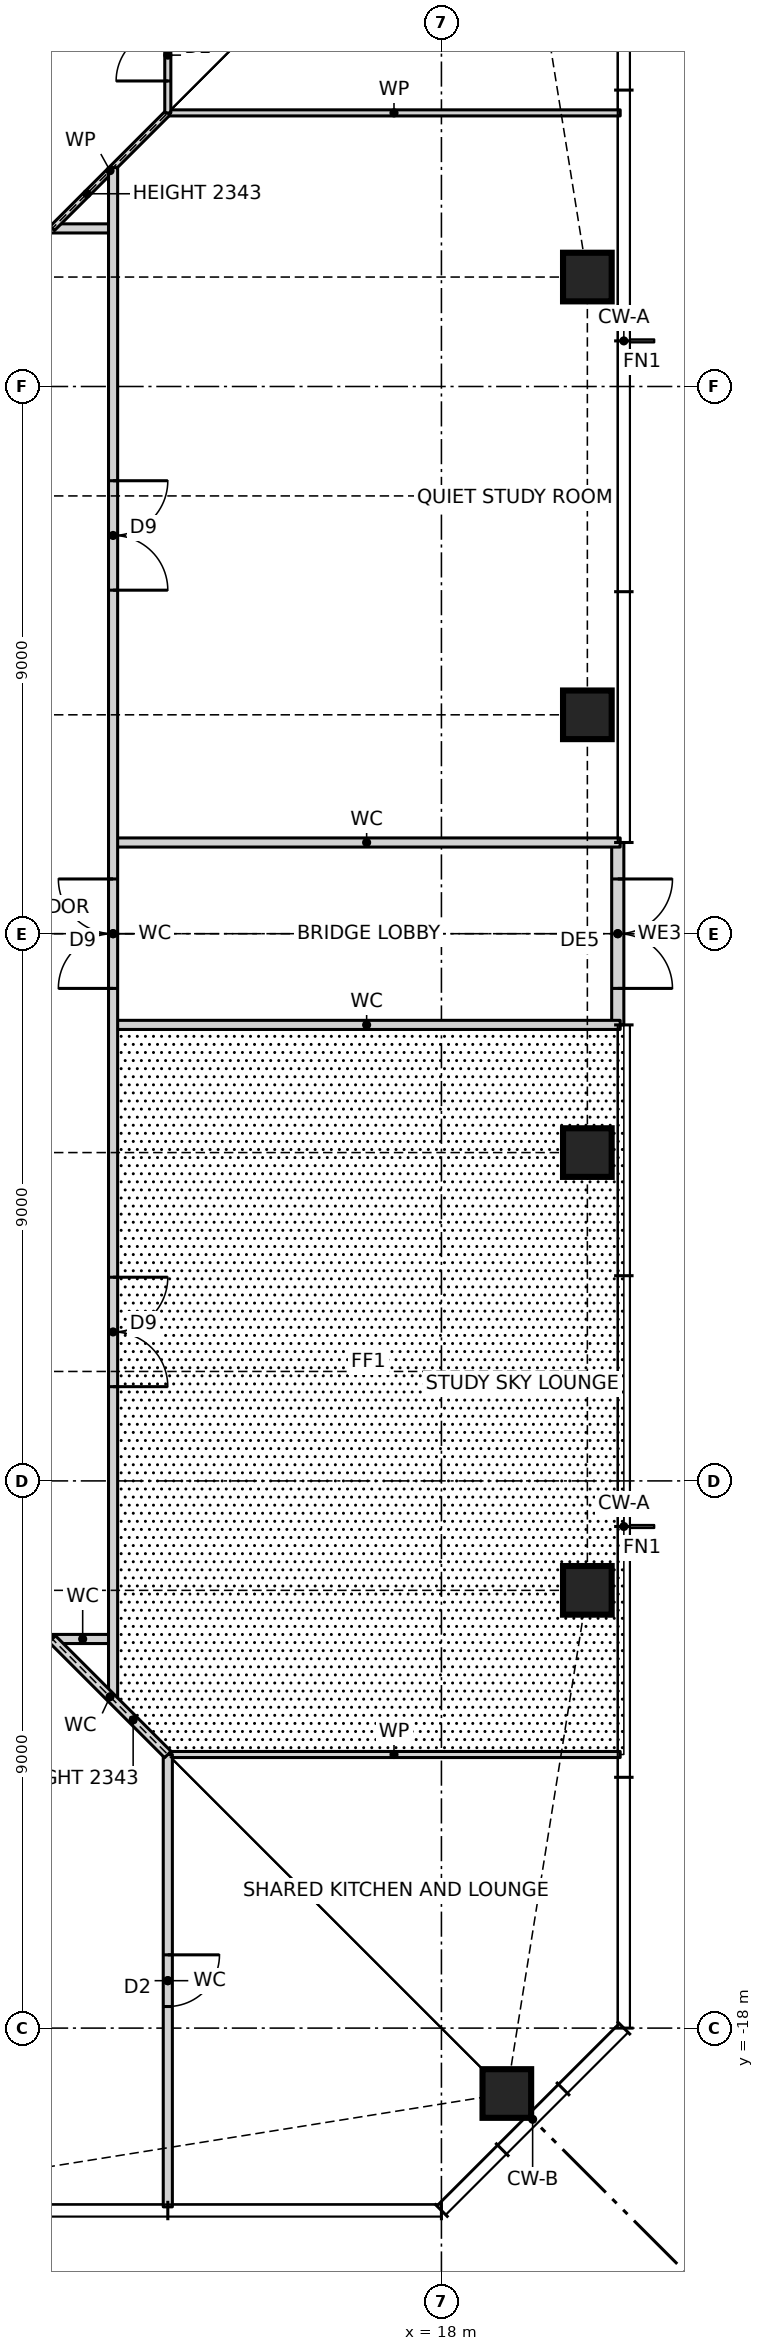
"""IFC4 building model, lengths in metres.
Left out: names, types, materials, properties, quantities, classifications, styles, units other than length and angle.
Written with IfcOpenShell. Run it as: python <this file> out.ifc"""

import sys

from ifc_helpers import new_model, si_unit, direction, frame, frame_2d, origin, origin_2d, place, context, subcontext, project, spatial, rectangle, hollow_rectangle, extrude, element, fill, save


model = new_model("IFC4")
c1 = context("Model", 3, precision=1e-05, world=origin(), true_north=direction((0.0, 1.0)))
c2 = subcontext(c1, "Body", "Model", "MODEL_VIEW")
j1 = project(units=[si_unit("LENGTHUNIT", "METRE"), si_unit("PLANEANGLEUNIT", "RADIAN")], contexts=[c1])
p1 = place(None, origin())
s1 = spatial("IfcSite", under=j1, at=p1, CompositionType="ELEMENT")
p2 = place(p1, origin())
s2 = spatial("IfcBuilding", under=s1, at=p2, CompositionType="ELEMENT")
p3 = place(p2, frame((0.0, 0.0, 98.0)))
s3 = spatial("IfcBuildingStorey", under=s2, at=p3, CompositionType="ELEMENT", Elevation=98.0)
for number, where, z_axis, x_axis in (
    (1, (19.076, -19.076, 0.0), (0.0, 0.0, 1.0), (1.0, 0.0, 0.0)),
    (2, (20.4, -10.8, 0.0), (0.0, 0.0, 1.0), (1.0, 0.0, 0.0)),
    (3, (20.4, -3.6, 0.0), (0.0, 0.0, 1.0), (1.0, 0.0, 0.0)),
    (4, (20.4, 3.6, 0.0), (0.0, 0.0, 1.0), (1.0, 0.0, 0.0)),
    (5, (20.4, 10.8, 0.0), (0.0, 0.0, 1.0), (1.0, 0.0, 0.0)),
):
    element("IfcColumn", number, at=place(p3, frame(where, z_axis=z_axis, x_axis=x_axis)), inside=s3, PredefinedType="COLUMN", context=c2, shape_type="SweptSolid", body=[
        extrude(hollow_rectangle(XDim=0.8, YDim=0.8, WallThickness=0.07, at=origin_2d()), origin(), (0.0, 0.0, 1.0), 3.5),
    ])
p4 = place(p3, frame((20.9, -1.5, 0.0), z_axis=(0.0, 0.0, 1.0), x_axis=(0.0, 1.0, 0.0)))
e6 = element("IfcWall", 6, at=p4, inside=s3, PredefinedType="SOLIDWALL", context=c2, shape_type="SweptSolid", body=[
    extrude(rectangle(XDim=3.0, YDim=0.2, at=frame_2d((1.5, 0.0))), origin(), (0.0, 0.0, 1.0), 3.27),
])
p5 = place(p4, frame((0.6, 0.0, 0.0)))
e7 = element("IfcOpeningElement", 7, at=p5, cuts=e6, PredefinedType="OPENING", context=c2, shape_type="SweptSolid", body=[
    extrude(rectangle(XDim=1.8, YDim=2.4, at=frame_2d((0.9, 1.2))), frame((0.0, 0.11, 0.0), z_axis=(0.0, -1.0, 0.0), x_axis=(1.0, 0.0, 0.0)), (0.0, 0.0, 1.0), 0.22),
])
p6 = place(p3, frame((13.5, -13.5, 0.0), z_axis=(0.0, 0.0, 1.0), x_axis=(1.0, 0.0, 0.0)))
e8 = element("IfcWall", 8, at=p6, inside=s3, PredefinedType="PARTITIONING", context=c2, shape_type="SweptSolid", body=[
    extrude(rectangle(XDim=7.44, YDim=0.1, at=frame_2d((3.72, 0.0))), origin(), (0.0, 0.0, 1.0), 3.27),
])
p7 = place(p3, frame((11.6, -11.6, 0.0), z_axis=(0.0, 0.0, 1.0), x_axis=(1.0, 0.0, 0.0)))
e9 = element("IfcWall", 9, at=p7, inside=s3, PredefinedType="PARTITIONING", context=c2, shape_type="SweptSolid", body=[
    extrude(rectangle(XDim=1.0, YDim=0.15, at=frame_2d((0.5, 0.0))), origin(), (0.0, 0.0, 1.0), 3.27),
])
for number, where, z_axis, x_axis in (
    (10, (12.6, -1.5, 0.0), (0.0, 0.0, 1.0), (1.0, 0.0, 0.0)),
    (11, (12.6, 1.5, 0.0), (0.0, 0.0, 1.0), (1.0, 0.0, 0.0)),
):
    element("IfcWall", number, at=place(p3, frame(where, z_axis=z_axis, x_axis=x_axis)), inside=s3, PredefinedType="PARTITIONING", context=c2, shape_type="SweptSolid", body=[
        extrude(rectangle(XDim=8.34, YDim=0.15, at=frame_2d((4.17, 0.0))), origin(), (0.0, 0.0, 1.0), 3.27),
    ])
p8 = place(p3, frame((-9.0, 11.6, 0.0), z_axis=(0.0, 0.0, 1.0), x_axis=(1.0, 0.0, 0.0)))
e12 = element("IfcWall", 12, at=p8, inside=s3, PredefinedType="PARTITIONING", context=c2, shape_type="SweptSolid", body=[
    extrude(rectangle(XDim=21.6, YDim=0.15, at=frame_2d((10.8, 0.0))), origin(), (0.0, 0.0, 1.0), 3.27),
])
p9 = place(p8, frame((16.3, 0.0, 0.0)))
e13 = element("IfcOpeningElement", 13, at=p9, cuts=e12, PredefinedType="OPENING", context=c2, shape_type="SweptSolid", body=[
    extrude(rectangle(XDim=1.0, YDim=2.1, at=frame_2d((0.5, 1.05))), frame((0.0, 0.085, 0.0), z_axis=(0.0, -1.0, 0.0), x_axis=(1.0, 0.0, 0.0)), (0.0, 0.0, 1.0), 0.17),
])
p10 = place(p3, frame((13.5, 13.5, 0.0), z_axis=(0.0, 0.0, 1.0), x_axis=(1.0, 0.0, 0.0)))
e14 = element("IfcWall", 14, at=p10, inside=s3, PredefinedType="PARTITIONING", context=c2, shape_type="SweptSolid", body=[
    extrude(rectangle(XDim=7.44, YDim=0.1, at=frame_2d((3.72, 0.0))), origin(), (0.0, 0.0, 1.0), 3.27),
])
p11 = place(p3, frame((11.6, 11.6, 0.0), z_axis=(0.0, 0.0, 1.0), x_axis=(0.707106781187, 0.707106781187, 0.0)))
e15 = element("IfcWall", 15, at=p11, inside=s3, PredefinedType="PARTITIONING", context=c2, shape_type="SweptSolid", body=[
    extrude(rectangle(XDim=2.687, YDim=0.1, at=frame_2d((1.343, 0.0))), origin(), (0.0, 0.0, 1.0), 2.343),
])
p12 = place(p3, frame((13.5, -20.94, 0.0), z_axis=(0.0, 0.0, 1.0), x_axis=(0.0, 1.0, 0.0)))
e16 = element("IfcWall", 16, at=p12, inside=s3, PredefinedType="PARTITIONING", context=c2, shape_type="SweptSolid", body=[
    extrude(rectangle(XDim=7.44, YDim=0.15, at=frame_2d((3.72, 0.0))), origin(), (0.0, 0.0, 1.0), 3.27),
])
p13 = place(p12, frame((3.295, 0.0, 0.0)))
e17 = element("IfcOpeningElement", 17, at=p13, cuts=e16, PredefinedType="OPENING", context=c2, shape_type="SweptSolid", body=[
    extrude(rectangle(XDim=0.85, YDim=2.1, at=frame_2d((0.425, 1.05))), frame((0.0, 0.085, 0.0), z_axis=(0.0, -1.0, 0.0), x_axis=(1.0, 0.0, 0.0)), (0.0, 0.0, 1.0), 0.17),
])
p14 = place(p3, frame((13.5, 13.5, 0.0), z_axis=(0.0, 0.0, 1.0), x_axis=(0.0, 1.0, 0.0)))
e18 = element("IfcWall", 18, at=p14, inside=s3, PredefinedType="PARTITIONING", context=c2, shape_type="SweptSolid", body=[
    extrude(rectangle(XDim=7.44, YDim=0.1, at=frame_2d((3.72, 0.0))), origin(), (0.0, 0.0, 1.0), 3.27),
])
p15 = place(p14, frame((0.525, 0.0, 0.0)))
e19 = element("IfcOpeningElement", 19, at=p15, cuts=e18, PredefinedType="OPENING", context=c2, shape_type="SweptSolid", body=[
    extrude(rectangle(XDim=0.85, YDim=2.1, at=frame_2d((0.425, 1.05))), frame((0.0, 0.06, 0.0), z_axis=(0.0, -1.0, 0.0), x_axis=(1.0, 0.0, 0.0)), (0.0, 0.0, 1.0), 0.12),
])
p16 = place(p3, frame((12.6, -12.6, 0.0), z_axis=(0.0, 0.0, 1.0), x_axis=(0.0, 1.0, 0.0)))
e20 = element("IfcWall", 20, at=p16, inside=s3, PredefinedType="PARTITIONING", context=c2, shape_type="SweptSolid", body=[
    extrude(rectangle(XDim=25.2, YDim=0.15, at=frame_2d((12.6, 0.0))), origin(), (0.0, 0.0, 1.0), 3.27),
])
p17 = place(p16, frame((5.15, 0.0, 0.0)))
e21 = element("IfcOpeningElement", 21, at=p17, cuts=e20, PredefinedType="OPENING", context=c2, shape_type="SweptSolid", body=[
    extrude(rectangle(XDim=1.8, YDim=2.1, at=frame_2d((0.9, 1.05))), frame((0.0, 0.085, 0.0), z_axis=(0.0, -1.0, 0.0), x_axis=(1.0, 0.0, 0.0)), (0.0, 0.0, 1.0), 0.17),
])
p18 = place(p16, frame((11.7, 0.0, 0.0)))
e22 = element("IfcOpeningElement", 22, at=p18, cuts=e20, PredefinedType="OPENING", context=c2, shape_type="SweptSolid", body=[
    extrude(rectangle(XDim=1.8, YDim=2.1, at=frame_2d((0.9, 1.05))), frame((0.0, 0.085, 0.0), z_axis=(0.0, -1.0, 0.0), x_axis=(1.0, 0.0, 0.0)), (0.0, 0.0, 1.0), 0.17),
])
p19 = place(p16, frame((18.25, 0.0, 0.0)))
e23 = element("IfcOpeningElement", 23, at=p19, cuts=e20, PredefinedType="OPENING", context=c2, shape_type="SweptSolid", body=[
    extrude(rectangle(XDim=1.8, YDim=2.1, at=frame_2d((0.9, 1.05))), frame((0.0, 0.085, 0.0), z_axis=(0.0, -1.0, 0.0), x_axis=(1.0, 0.0, 0.0)), (0.0, 0.0, 1.0), 0.17),
])
p20 = place(p3, frame((13.5, -13.5, 0.0), z_axis=(0.0, 0.0, 1.0), x_axis=(-0.707106781187, 0.707106781187, 0.0)))
e24 = element("IfcWall", 24, at=p20, inside=s3, PredefinedType="PARTITIONING", context=c2, shape_type="SweptSolid", body=[
    extrude(rectangle(XDim=2.687, YDim=0.15, at=frame_2d((1.343, 0.0))), origin(), (0.0, 0.0, 1.0), 2.343),
])
p21 = place(p5, frame((1.8, 0.0, 0.0), z_axis=(0.0, 0.0, 1.0), x_axis=(-1.0, 0.0, 0.0)))
e25 = element("IfcDoor", 25, at=p21, inside=s3, OperationType="DOUBLE_DOOR_SINGLE_SWING", PredefinedType="DOOR", context=c2, shape_type="SweptSolid", body=[
    extrude(rectangle(XDim=1.8, YDim=2.4, at=frame_2d((0.9, 1.2))), frame((0.0, 0.025, 0.0), z_axis=(0.0, -1.0, 0.0), x_axis=(1.0, 0.0, 0.0)), (0.0, 0.0, 1.0), 0.05),
])
fill(e7, e25)
p22 = place(p17, frame((1.8, 0.0, 0.0), z_axis=(0.0, 0.0, 1.0), x_axis=(-1.0, 0.0, 0.0)))
e26 = element("IfcDoor", 26, at=p22, inside=s3, OperationType="DOUBLE_DOOR_SINGLE_SWING", PredefinedType="DOOR", context=c2, shape_type="SweptSolid", body=[
    extrude(rectangle(XDim=1.8, YDim=2.1, at=frame_2d((0.9, 1.05))), frame((0.0, 0.025, 0.0), z_axis=(0.0, -1.0, 0.0), x_axis=(1.0, 0.0, 0.0)), (0.0, 0.0, 1.0), 0.05),
])
fill(e21, e26)
p23 = place(p18, origin())
e27 = element("IfcDoor", 27, at=p23, inside=s3, OperationType="DOUBLE_DOOR_SINGLE_SWING", PredefinedType="DOOR", context=c2, shape_type="SweptSolid", body=[
    extrude(rectangle(XDim=1.8, YDim=2.1, at=frame_2d((0.9, 1.05))), frame((0.0, 0.025, 0.0), z_axis=(0.0, -1.0, 0.0), x_axis=(1.0, 0.0, 0.0)), (0.0, 0.0, 1.0), 0.05),
])
fill(e22, e27)
p24 = place(p19, frame((1.8, 0.0, 0.0), z_axis=(0.0, 0.0, 1.0), x_axis=(-1.0, 0.0, 0.0)))
e28 = element("IfcDoor", 28, at=p24, inside=s3, OperationType="DOUBLE_DOOR_SINGLE_SWING", PredefinedType="DOOR", context=c2, shape_type="SweptSolid", body=[
    extrude(rectangle(XDim=1.8, YDim=2.1, at=frame_2d((0.9, 1.05))), frame((0.0, 0.025, 0.0), z_axis=(0.0, -1.0, 0.0), x_axis=(1.0, 0.0, 0.0)), (0.0, 0.0, 1.0), 0.05),
])
fill(e23, e28)
p25 = place(p13, frame((0.85, 0.0, 0.0), z_axis=(0.0, 0.0, 1.0), x_axis=(-1.0, 0.0, 0.0)))
e29 = element("IfcDoor", 29, at=p25, inside=s3, OperationType="SINGLE_SWING_LEFT", PredefinedType="DOOR", context=c2, shape_type="SweptSolid", body=[
    extrude(rectangle(XDim=0.85, YDim=2.1, at=frame_2d((0.425, 1.05))), frame((0.0, 0.025, 0.0), z_axis=(0.0, -1.0, 0.0), x_axis=(1.0, 0.0, 0.0)), (0.0, 0.0, 1.0), 0.05),
])
fill(e17, e29)
p26 = place(p15, origin())
e30 = element("IfcDoor", 30, at=p26, inside=s3, OperationType="SINGLE_SWING_LEFT", PredefinedType="DOOR", context=c2, shape_type="SweptSolid", body=[
    extrude(rectangle(XDim=0.85, YDim=2.1, at=frame_2d((0.425, 1.05))), frame((0.0, 0.025, 0.0), z_axis=(0.0, -1.0, 0.0), x_axis=(1.0, 0.0, 0.0)), (0.0, 0.0, 1.0), 0.05),
])
fill(e19, e30)
save(model, sys.argv[1])
